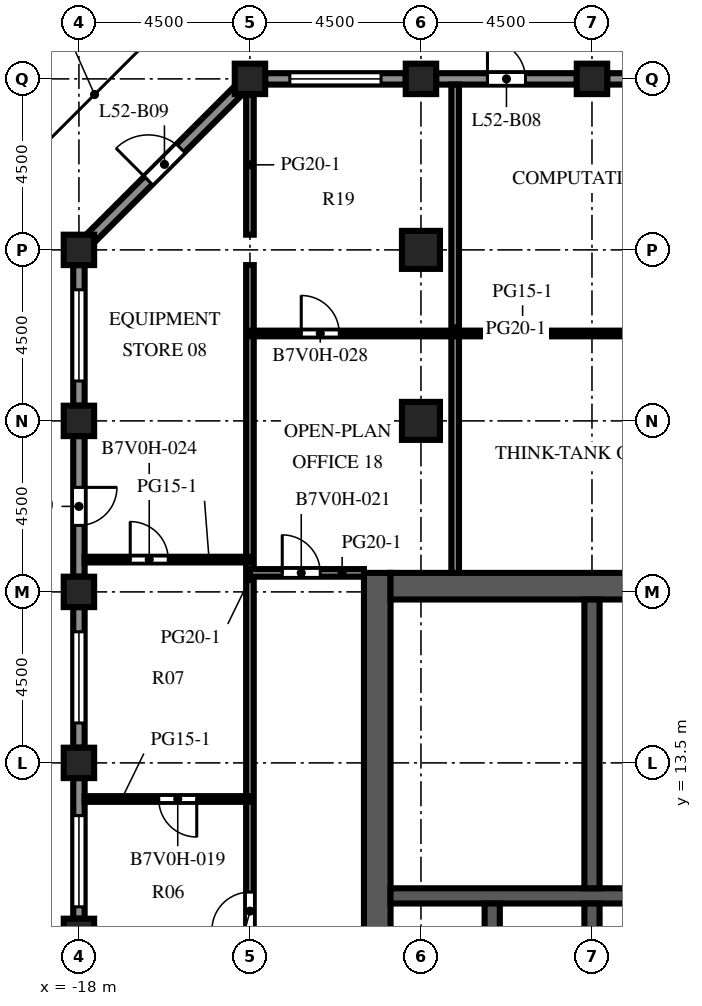
"""IFC4 building model, lengths in metres.
Left out: names, types, materials, properties, quantities, classifications, styles, units other than length and angle.
Written with IfcOpenShell. Run it as: python <this file> out.ifc"""

import sys

from ifc_helpers import new_model, si_unit, direction, frame, frame_2d, origin, origin_2d, place, context, subcontext, project, spatial, rectangle, extrude, element, fill, save


model = new_model("IFC4")
c1 = context("Model", 3, precision=1e-05, world=origin(), true_north=direction((0.0, 1.0)))
c2 = subcontext(c1, "Body", "Model", "MODEL_VIEW")
j1 = project(units=[si_unit("LENGTHUNIT", "METRE"), si_unit("PLANEANGLEUNIT", "RADIAN")], contexts=[c1])
p1 = place(None, origin())
s1 = spatial("IfcSite", under=j1, at=p1, CompositionType="ELEMENT")
p2 = place(p1, origin())
s2 = spatial("IfcBuilding", under=s1, at=p2, CompositionType="ELEMENT")
p3 = place(p2, frame((0.0, 0.0, 231.6)))
s3 = spatial("IfcBuildingStorey", under=s2, at=p3, CompositionType="ELEMENT", Elevation=231.6)
for number, where, z_axis, x_axis in (
    (1, (-18.0, 9.0, 0.0), (0.0, 0.0, 1.0), (1.0, 0.0, 0.0)),
    (2, (-18.0, 13.5, 0.0), (0.0, 0.0, 1.0), (1.0, 0.0, 0.0)),
    (3, (-18.0, 18.0, 0.0), (0.0, 0.0, 1.0), (1.0, 0.0, 0.0)),
    (4, (-18.0, 22.5, 0.0), (0.0, 0.0, 1.0), (1.0, 0.0, 0.0)),
    (5, (-18.0, 27.0, 0.0), (0.0, 0.0, 1.0), (1.0, 0.0, 0.0)),
):
    element("IfcColumn", number, at=place(p3, frame(where, z_axis=z_axis, x_axis=x_axis)), inside=s3, PredefinedType="COLUMN", context=c2, shape_type="SweptSolid", body=[
        extrude(rectangle(XDim=0.8, YDim=0.8, at=origin_2d()), origin(), (0.0, 0.0, 1.0), 4.1),
    ])
for number, where, z_axis, x_axis in (
    (6, (-13.5, 31.5, -0.45), (0.0, 0.0, 1.0), (1.0, 0.0, 0.0)),
    (7, (-9.0, 31.5, -0.45), (0.0, 0.0, 1.0), (1.0, 0.0, 0.0)),
    (8, (-4.5, 31.5, -0.45), (0.0, 0.0, 1.0), (1.0, 0.0, 0.0)),
):
    element("IfcColumn", number, at=place(p3, frame(where, z_axis=z_axis, x_axis=x_axis)), inside=s3, PredefinedType="COLUMN", context=c2, shape_type="SweptSolid", body=[
        extrude(rectangle(XDim=0.8, YDim=0.8, at=origin_2d()), origin(), (0.0, 0.0, 1.0), 4.55),
    ])
for number, where, z_axis, x_axis in (
    (9, (-9.0, 22.5, -0.45), (0.0, 0.0, 1.0), (1.0, 0.0, 0.0)),
    (10, (-9.0, 27.0, -0.45), (0.0, 0.0, 1.0), (1.0, 0.0, 0.0)),
):
    element("IfcColumn", number, at=place(p3, frame(where, z_axis=z_axis, x_axis=x_axis)), inside=s3, PredefinedType="COLUMN", context=c2, shape_type="SweptSolid", body=[
        extrude(rectangle(XDim=1.0, YDim=1.0, at=origin_2d()), origin(), (0.0, 0.0, 1.0), 4.55),
    ])
p4 = place(p3, frame((-10.15, -9.0, 0.0), z_axis=(0.0, 0.0, 1.0), x_axis=(0.0, 1.0, 0.0)))
e11 = element("IfcWall", 11, at=p4, inside=s3, PredefinedType="SHEAR", context=c2, shape_type="SweptSolid", body=[
    extrude(rectangle(XDim=27.5, YDim=0.7, at=frame_2d((13.75, 0.0))), origin(), (0.0, 0.0, 1.0), 4.1),
])
p5 = place(p4, frame((12.55, 0.0, 0.0)))
e12 = element("IfcOpeningElement", 12, at=p5, cuts=e11, PredefinedType="OPENING", context=c2, shape_type="SweptSolid", body=[
    extrude(rectangle(XDim=2.4, YDim=2.4, at=frame_2d((1.2, 1.2))), frame((0.0, 0.36, 0.0), z_axis=(0.0, -1.0, 0.0), x_axis=(1.0, 0.0, 0.0)), (0.0, 0.0, 1.0), 0.72),
])
p6 = place(p4, frame((6.825, 0.0, 0.0)))
e13 = element("IfcOpeningElement", 13, at=p6, cuts=e11, PredefinedType="OPENING", context=c2, shape_type="SweptSolid", body=[
    extrude(rectangle(XDim=1.2, YDim=2.1, at=frame_2d((0.6, 1.05))), frame((0.0, 0.36, 0.0), z_axis=(0.0, -1.0, 0.0), x_axis=(1.0, 0.0, 0.0)), (0.0, 0.0, 1.0), 0.72),
])
p7 = place(p4, frame((19.475, 0.0, 0.0)))
e14 = element("IfcOpeningElement", 14, at=p7, cuts=e11, PredefinedType="OPENING", context=c2, shape_type="SweptSolid", body=[
    extrude(rectangle(XDim=1.2, YDim=2.1, at=frame_2d((0.6, 1.05))), frame((0.0, 0.36, 0.0), z_axis=(0.0, -1.0, 0.0), x_axis=(1.0, 0.0, 0.0)), (0.0, 0.0, 1.0), 0.72),
])
p8 = place(p3, frame((-9.8, 18.15, 0.0), z_axis=(0.0, 0.0, 1.0), x_axis=(1.0, 0.0, 0.0)))
e15 = element("IfcWall", 15, at=p8, inside=s3, PredefinedType="SHEAR", context=c2, shape_type="SweptSolid", body=[
    extrude(rectangle(XDim=10.6, YDim=0.7, at=frame_2d((5.3, 0.0))), origin(), (0.0, 0.0, 1.0), 4.1),
])
p9 = place(p3, frame((-9.8, 10.0, 0.0), z_axis=(0.0, 0.0, 1.0), x_axis=(1.0, 0.0, 0.0)))
e16 = element("IfcWall", 16, at=p9, inside=s3, PredefinedType="SHEAR", context=c2, shape_type="SweptSolid", body=[
    extrude(rectangle(XDim=10.6, YDim=0.4, at=frame_2d((5.3, 0.0))), origin(), (0.0, 0.0, 1.0), 4.1),
])
for number, where, z_axis, x_axis in (
    (17, (-7.125, 6.9, 0.0), (0.0, 0.0, 1.0), (0.0, 1.0, 0.0)),
    (18, (-4.5, 6.9, 0.0), (0.0, 0.0, 1.0), (0.0, 1.0, 0.0)),
):
    element("IfcWall", number, at=place(p3, frame(where, z_axis=z_axis, x_axis=x_axis)), inside=s3, PredefinedType="SHEAR", context=c2, shape_type="SweptSolid", body=[
        extrude(rectangle(XDim=2.9, YDim=0.4, at=frame_2d((1.45, 0.0))), origin(), (0.0, 0.0, 1.0), 4.1),
    ])
p10 = place(p3, frame((-4.5, 10.2, 0.0), z_axis=(0.0, 0.0, 1.0), x_axis=(0.0, 1.0, 0.0)))
e19 = element("IfcWall", 19, at=p10, inside=s3, PredefinedType="SHEAR", context=c2, shape_type="SweptSolid", body=[
    extrude(rectangle(XDim=7.6, YDim=0.4, at=frame_2d((3.8, 0.0))), origin(), (0.0, 0.0, 1.0), 4.1),
])
p11 = place(p3, frame((-4.1, 31.5, 0.0), z_axis=(0.0, 0.0, 1.0), x_axis=(1.0, 0.0, 0.0)))
e20 = element("IfcWall", 20, at=p11, inside=s3, PredefinedType="SOLIDWALL", context=c2, shape_type="SweptSolid", body=[
    extrude(rectangle(XDim=3.7, YDim=0.3, at=frame_2d((1.85, 0.0))), origin(), (0.0, 0.0, 1.0), 2.85),
])
p12 = place(p11, frame((0.65, 0.0, 0.8)))
e21 = element("IfcOpeningElement", 21, at=p12, cuts=e20, PredefinedType="OPENING", context=c2, shape_type="SweptSolid", body=[
    extrude(rectangle(XDim=2.4, YDim=1.7, at=frame_2d((1.2, 0.85))), frame((0.0, 0.16, 0.0), z_axis=(0.0, -1.0, 0.0), x_axis=(1.0, 0.0, 0.0)), (0.0, 0.0, 1.0), 0.32),
])
p13 = place(p3, frame((-8.6, 31.5, 0.0), z_axis=(0.0, 0.0, 1.0), x_axis=(1.0, 0.0, 0.0)))
e22 = element("IfcWall", 22, at=p13, inside=s3, PredefinedType="SOLIDWALL", context=c2, shape_type="SweptSolid", body=[
    extrude(rectangle(XDim=3.7, YDim=0.3, at=frame_2d((1.85, 0.0))), origin(), (0.0, 0.0, 1.0), 2.85),
])
p14 = place(p13, frame((1.35, 0.0, 0.0)))
e23 = element("IfcOpeningElement", 23, at=p14, cuts=e22, PredefinedType="OPENING", context=c2, shape_type="SweptSolid", body=[
    extrude(rectangle(XDim=1.0, YDim=2.2, at=frame_2d((0.5, 1.1))), frame((0.0, 0.16, 0.0), z_axis=(0.0, -1.0, 0.0), x_axis=(1.0, 0.0, 0.0)), (0.0, 0.0, 1.0), 0.32),
])
p15 = place(p3, frame((-13.1, 31.5, 0.0), z_axis=(0.0, 0.0, 1.0), x_axis=(1.0, 0.0, 0.0)))
e24 = element("IfcWall", 24, at=p15, inside=s3, PredefinedType="SOLIDWALL", context=c2, shape_type="SweptSolid", body=[
    extrude(rectangle(XDim=3.7, YDim=0.3, at=frame_2d((1.85, 0.0))), origin(), (0.0, 0.0, 1.0), 2.85),
])
p16 = place(p15, frame((0.65, 0.0, 0.8)))
e25 = element("IfcOpeningElement", 25, at=p16, cuts=e24, PredefinedType="OPENING", context=c2, shape_type="SweptSolid", body=[
    extrude(rectangle(XDim=2.4, YDim=1.7, at=frame_2d((1.2, 0.85))), frame((0.0, 0.16, 0.0), z_axis=(0.0, -1.0, 0.0), x_axis=(1.0, 0.0, 0.0)), (0.0, 0.0, 1.0), 0.32),
])
p17 = place(p3, frame((-17.706, 27.294, 0.0), z_axis=(0.0, 0.0, 1.0), x_axis=(0.707106781187, 0.707106781187, 0.0)))
e26 = element("IfcWall", 26, at=p17, inside=s3, PredefinedType="SOLIDWALL", context=c2, shape_type="SweptSolid", body=[
    extrude(rectangle(XDim=5.532, YDim=0.3, at=frame_2d((2.766, 0.0))), origin(), (0.0, 0.0, 1.0), 2.85),
])
p18 = place(p17, frame((2.166, 0.0, 0.0)))
e27 = element("IfcOpeningElement", 27, at=p18, cuts=e26, PredefinedType="OPENING", context=c2, shape_type="SweptSolid", body=[
    extrude(rectangle(XDim=1.2, YDim=2.2, at=frame_2d((0.6, 1.1))), frame((0.0, 0.16, 0.0), z_axis=(0.0, -1.0, 0.0), x_axis=(1.0, 0.0, 0.0)), (0.0, 0.0, 1.0), 0.32),
])
p19 = place(p3, frame((-18.0, 22.9, 0.0), z_axis=(0.0, 0.0, 1.0), x_axis=(0.0, 1.0, 0.0)))
e28 = element("IfcWall", 28, at=p19, inside=s3, PredefinedType="SOLIDWALL", context=c2, shape_type="SweptSolid", body=[
    extrude(rectangle(XDim=3.7, YDim=0.3, at=frame_2d((1.85, 0.0))), origin(), (0.0, 0.0, 1.0), 2.85),
])
p20 = place(p19, frame((0.65, 0.0, 0.8)))
e29 = element("IfcOpeningElement", 29, at=p20, cuts=e28, PredefinedType="OPENING", context=c2, shape_type="SweptSolid", body=[
    extrude(rectangle(XDim=2.4, YDim=1.7, at=frame_2d((1.2, 0.85))), frame((0.0, 0.16, 0.0), z_axis=(0.0, -1.0, 0.0), x_axis=(1.0, 0.0, 0.0)), (0.0, 0.0, 1.0), 0.32),
])
p21 = place(p3, frame((-18.0, 18.4, 0.0), z_axis=(0.0, 0.0, 1.0), x_axis=(0.0, 1.0, 0.0)))
e30 = element("IfcWall", 30, at=p21, inside=s3, PredefinedType="SOLIDWALL", context=c2, shape_type="SweptSolid", body=[
    extrude(rectangle(XDim=3.7, YDim=0.3, at=frame_2d((1.85, 0.0))), origin(), (0.0, 0.0, 1.0), 2.85),
])
p22 = place(p21, frame((1.35, 0.0, 0.0)))
e31 = element("IfcOpeningElement", 31, at=p22, cuts=e30, PredefinedType="OPENING", context=c2, shape_type="SweptSolid", body=[
    extrude(rectangle(XDim=1.0, YDim=2.2, at=frame_2d((0.5, 1.1))), frame((0.0, 0.16, 0.0), z_axis=(0.0, -1.0, 0.0), x_axis=(1.0, 0.0, 0.0)), (0.0, 0.0, 1.0), 0.32),
])
p23 = place(p3, frame((-18.0, 13.9, 0.0), z_axis=(0.0, 0.0, 1.0), x_axis=(0.0, 1.0, 0.0)))
e32 = element("IfcWall", 32, at=p23, inside=s3, PredefinedType="SOLIDWALL", context=c2, shape_type="SweptSolid", body=[
    extrude(rectangle(XDim=3.7, YDim=0.3, at=frame_2d((1.85, 0.0))), origin(), (0.0, 0.0, 1.0), 2.85),
])
p24 = place(p23, frame((0.65, 0.0, 0.8)))
e33 = element("IfcOpeningElement", 33, at=p24, cuts=e32, PredefinedType="OPENING", context=c2, shape_type="SweptSolid", body=[
    extrude(rectangle(XDim=2.4, YDim=1.7, at=frame_2d((1.2, 0.85))), frame((0.0, 0.16, 0.0), z_axis=(0.0, -1.0, 0.0), x_axis=(1.0, 0.0, 0.0)), (0.0, 0.0, 1.0), 0.32),
])
p25 = place(p3, frame((-18.0, 9.4, 0.0), z_axis=(0.0, 0.0, 1.0), x_axis=(0.0, 1.0, 0.0)))
e34 = element("IfcWall", 34, at=p25, inside=s3, PredefinedType="SOLIDWALL", context=c2, shape_type="SweptSolid", body=[
    extrude(rectangle(XDim=3.7, YDim=0.3, at=frame_2d((1.85, 0.0))), origin(), (0.0, 0.0, 1.0), 2.85),
])
p26 = place(p25, frame((0.312, 0.0, 0.8)))
e35 = element("IfcOpeningElement", 35, at=p26, cuts=e34, PredefinedType="OPENING", context=c2, shape_type="SweptSolid", body=[
    extrude(rectangle(XDim=2.4, YDim=1.7, at=frame_2d((1.2, 0.85))), frame((0.0, 0.16, 0.0), z_axis=(0.0, -1.0, 0.0), x_axis=(1.0, 0.0, 0.0)), (0.0, 0.0, 1.0), 0.32),
])
for number, where, z_axis, x_axis in (
    (36, (-4.3, 11.72, 0.0), (0.0, 0.0, 1.0), (1.0, 0.0, 0.0)),
    (37, (-4.3, 13.62, 0.0), (0.0, 0.0, 1.0), (1.0, 0.0, 0.0)),
    (38, (-4.3, 15.9, 0.0), (0.0, 0.0, 1.0), (1.0, 0.0, 0.0)),
):
    element("IfcWall", number, at=place(p3, frame(where, z_axis=z_axis, x_axis=x_axis)), inside=s3, PredefinedType="PARTITIONING", context=c2, shape_type="SweptSolid", body=[
        extrude(rectangle(XDim=5.1, YDim=0.1, at=frame_2d((2.55, 0.0))), origin(), (0.0, 0.0, 1.0), 3.65),
    ])
p27 = place(p3, frame((-13.5, 6.25, 0.0), z_axis=(0.0, 0.0, 1.0), x_axis=(0.0, 1.0, 0.0)))
e39 = element("IfcWall", 39, at=p27, inside=s3, PredefinedType="PARTITIONING", context=c2, shape_type="SweptSolid", body=[
    extrude(rectangle(XDim=20.35, YDim=0.2, at=frame_2d((10.175, 0.0))), origin(), (0.0, 0.0, 1.0), 3.65),
])
p28 = place(p27, frame((2.85, 0.0, 0.0)))
e40 = element("IfcOpeningElement", 40, at=p28, cuts=e39, PredefinedType="OPENING", context=c2, shape_type="SweptSolid", body=[
    extrude(rectangle(XDim=1.0, YDim=2.1, at=frame_2d((0.5, 1.05))), frame((0.0, 0.11, 0.0), z_axis=(0.0, -1.0, 0.0), x_axis=(1.0, 0.0, 0.0)), (0.0, 0.0, 1.0), 0.22),
])
p29 = place(p3, frame((-13.5, 27.4, 0.0), z_axis=(0.0, 0.0, 1.0), x_axis=(0.0, 1.0, 0.0)))
e41 = element("IfcWall", 41, at=p29, inside=s3, PredefinedType="PARTITIONING", context=c2, shape_type="SweptSolid", body=[
    extrude(rectangle(XDim=3.677, YDim=0.2, at=frame_2d((1.839, 0.0))), origin(), (0.0, 0.0, 1.0), 3.65),
])
p30 = place(p3, frame((-8.1, 18.5, 0.0), z_axis=(0.0, 0.0, 1.0), x_axis=(0.0, 1.0, 0.0)))
e42 = element("IfcWall", 42, at=p30, inside=s3, PredefinedType="PARTITIONING", context=c2, shape_type="SweptSolid", body=[
    extrude(rectangle(XDim=12.85, YDim=0.2, at=frame_2d((6.425, 0.0))), origin(), (0.0, 0.0, 1.0), 3.65),
])
p31 = place(p3, frame((-17.85, 12.55, 0.0), z_axis=(0.0, 0.0, 1.0), x_axis=(1.0, 0.0, 0.0)))
e43 = element("IfcWall", 43, at=p31, inside=s3, PredefinedType="PARTITIONING", context=c2, shape_type="SweptSolid", body=[
    extrude(rectangle(XDim=4.35, YDim=0.15, at=frame_2d((2.175, 0.0))), origin(), (0.0, 0.0, 1.0), 3.65),
])
p32 = place(p31, frame((1.95, 0.0, 0.0)))
e44 = element("IfcOpeningElement", 44, at=p32, cuts=e43, PredefinedType="OPENING", context=c2, shape_type="SweptSolid", body=[
    extrude(rectangle(XDim=1.0, YDim=2.1, at=frame_2d((0.5, 1.05))), frame((0.0, 0.085, 0.0), z_axis=(0.0, -1.0, 0.0), x_axis=(1.0, 0.0, 0.0)), (0.0, 0.0, 1.0), 0.17),
])
p33 = place(p3, frame((-13.5, 18.5, 0.0), z_axis=(0.0, 0.0, 1.0), x_axis=(1.0, 0.0, 0.0)))
e45 = element("IfcWall", 45, at=p33, inside=s3, PredefinedType="PARTITIONING", context=c2, shape_type="SweptSolid", body=[
    extrude(rectangle(XDim=3.0, YDim=0.2, at=frame_2d((1.5, 0.0))), origin(), (0.0, 0.0, 1.0), 3.65),
])
p34 = place(p33, frame((0.85, 0.0, 0.0)))
e46 = element("IfcOpeningElement", 46, at=p34, cuts=e45, PredefinedType="OPENING", context=c2, shape_type="SweptSolid", body=[
    extrude(rectangle(XDim=1.0, YDim=2.1, at=frame_2d((0.5, 1.05))), frame((0.0, 0.11, 0.0), z_axis=(0.0, -1.0, 0.0), x_axis=(1.0, 0.0, 0.0)), (0.0, 0.0, 1.0), 0.22),
])
p35 = place(p3, frame((-17.85, 18.85, 0.0), z_axis=(0.0, 0.0, 1.0), x_axis=(1.0, 0.0, 0.0)))
e47 = element("IfcWall", 47, at=p35, inside=s3, PredefinedType="PARTITIONING", context=c2, shape_type="SweptSolid", body=[
    extrude(rectangle(XDim=4.35, YDim=0.15, at=frame_2d((2.175, 0.0))), origin(), (0.0, 0.0, 1.0), 3.65),
])
p36 = place(p35, frame((1.2, 0.0, 0.0)))
e48 = element("IfcOpeningElement", 48, at=p36, cuts=e47, PredefinedType="OPENING", context=c2, shape_type="SweptSolid", body=[
    extrude(rectangle(XDim=1.0, YDim=2.1, at=frame_2d((0.5, 1.05))), frame((0.0, 0.085, 0.0), z_axis=(0.0, -1.0, 0.0), x_axis=(1.0, 0.0, 0.0)), (0.0, 0.0, 1.0), 0.17),
])
p37 = place(p3, frame((-13.5, 24.8, 0.0), z_axis=(0.0, 0.0, 1.0), x_axis=(1.0, 0.0, 0.0)))
e49 = element("IfcWall", 49, at=p37, inside=s3, PredefinedType="PARTITIONING", context=c2, shape_type="SweptSolid", body=[
    extrude(rectangle(XDim=34.5, YDim=0.15, at=frame_2d((17.25, 0.0))), origin(), (0.0, 0.0, 1.0), 3.65),
])
p38 = place(p37, frame((1.35, 0.0, 0.0)))
e50 = element("IfcOpeningElement", 50, at=p38, cuts=e49, PredefinedType="OPENING", context=c2, shape_type="SweptSolid", body=[
    extrude(rectangle(XDim=1.0, YDim=2.1, at=frame_2d((0.5, 1.05))), frame((0.0, 0.085, 0.0), z_axis=(0.0, -1.0, 0.0), x_axis=(1.0, 0.0, 0.0)), (0.0, 0.0, 1.0), 0.17),
])
p39 = place(p37, frame((12.0, 0.0, 0.0)))
e51 = element("IfcOpeningElement", 51, at=p39, cuts=e49, PredefinedType="OPENING", context=c2, shape_type="SweptSolid", body=[
    extrude(rectangle(XDim=1.0, YDim=2.1, at=frame_2d((0.5, 1.05))), frame((0.0, 0.085, 0.0), z_axis=(0.0, -1.0, 0.0), x_axis=(1.0, 0.0, 0.0)), (0.0, 0.0, 1.0), 0.17),
])
p40 = place(p37, frame((20.85, 0.0, 0.0)))
e52 = element("IfcOpeningElement", 52, at=p40, cuts=e49, PredefinedType="OPENING", context=c2, shape_type="SweptSolid", body=[
    extrude(rectangle(XDim=1.0, YDim=2.1, at=frame_2d((0.5, 1.05))), frame((0.0, 0.085, 0.0), z_axis=(0.0, -1.0, 0.0), x_axis=(1.0, 0.0, 0.0)), (0.0, 0.0, 1.0), 0.17),
])
p41 = place(p37, frame((29.85, 0.0, 0.0)))
e53 = element("IfcOpeningElement", 53, at=p41, cuts=e49, PredefinedType="OPENING", context=c2, shape_type="SweptSolid", body=[
    extrude(rectangle(XDim=1.0, YDim=2.1, at=frame_2d((0.5, 1.05))), frame((0.0, 0.085, 0.0), z_axis=(0.0, -1.0, 0.0), x_axis=(1.0, 0.0, 0.0)), (0.0, 0.0, 1.0), 0.17),
])
p42 = place(p14, origin())
e54 = element("IfcDoor", 54, at=p42, inside=s3, OperationType="SINGLE_SWING_LEFT", PredefinedType="DOOR", context=c2, shape_type="SweptSolid", body=[
    extrude(rectangle(XDim=1.0, YDim=2.2, at=frame_2d((0.5, 1.1))), frame((0.0, 0.025, 0.0), z_axis=(0.0, -1.0, 0.0), x_axis=(1.0, 0.0, 0.0)), (0.0, 0.0, 1.0), 0.05),
])
fill(e23, e54)
p43 = place(p16, origin())
e55 = element("IfcWindow", 55, at=p43, inside=s3, PartitioningType="SINGLE_PANEL", PredefinedType="WINDOW", context=c2, shape_type="SweptSolid", body=[
    extrude(rectangle(XDim=2.4, YDim=1.7, at=frame_2d((1.2, 0.85))), frame((0.0, 0.03, 0.0), z_axis=(0.0, -1.0, 0.0), x_axis=(1.0, 0.0, 0.0)), (0.0, 0.0, 1.0), 0.06),
])
fill(e25, e55)
p44 = place(p18, origin())
e56 = element("IfcDoor", 56, at=p44, inside=s3, OperationType="SINGLE_SWING_LEFT", PredefinedType="DOOR", context=c2, shape_type="SweptSolid", body=[
    extrude(rectangle(XDim=1.2, YDim=2.2, at=frame_2d((0.6, 1.1))), frame((0.0, 0.025, 0.0), z_axis=(0.0, -1.0, 0.0), x_axis=(1.0, 0.0, 0.0)), (0.0, 0.0, 1.0), 0.05),
])
fill(e27, e56)
p45 = place(p20, origin())
e57 = element("IfcWindow", 57, at=p45, inside=s3, PartitioningType="SINGLE_PANEL", PredefinedType="WINDOW", context=c2, shape_type="SweptSolid", body=[
    extrude(rectangle(XDim=2.4, YDim=1.7, at=frame_2d((1.2, 0.85))), frame((0.0, 0.03, 0.0), z_axis=(0.0, -1.0, 0.0), x_axis=(1.0, 0.0, 0.0)), (0.0, 0.0, 1.0), 0.06),
])
fill(e29, e57)
p46 = place(p22, origin())
e58 = element("IfcDoor", 58, at=p46, inside=s3, OperationType="SINGLE_SWING_RIGHT", PredefinedType="DOOR", context=c2, shape_type="SweptSolid", body=[
    extrude(rectangle(XDim=1.0, YDim=2.2, at=frame_2d((0.5, 1.1))), frame((0.0, 0.025, 0.0), z_axis=(0.0, -1.0, 0.0), x_axis=(1.0, 0.0, 0.0)), (0.0, 0.0, 1.0), 0.05),
])
fill(e31, e58)
p47 = place(p24, origin())
e59 = element("IfcWindow", 59, at=p47, inside=s3, PartitioningType="SINGLE_PANEL", PredefinedType="WINDOW", context=c2, shape_type="SweptSolid", body=[
    extrude(rectangle(XDim=2.4, YDim=1.7, at=frame_2d((1.2, 0.85))), frame((0.0, 0.03, 0.0), z_axis=(0.0, -1.0, 0.0), x_axis=(1.0, 0.0, 0.0)), (0.0, 0.0, 1.0), 0.06),
])
fill(e33, e59)
p48 = place(p26, origin())
e60 = element("IfcWindow", 60, at=p48, inside=s3, PartitioningType="SINGLE_PANEL", PredefinedType="WINDOW", context=c2, shape_type="SweptSolid", body=[
    extrude(rectangle(XDim=2.4, YDim=1.7, at=frame_2d((1.2, 0.85))), frame((0.0, 0.03, 0.0), z_axis=(0.0, -1.0, 0.0), x_axis=(1.0, 0.0, 0.0)), (0.0, 0.0, 1.0), 0.06),
])
fill(e35, e60)
p49 = place(p7, origin())
e61 = element("IfcDoor", 61, at=p49, inside=s3, OperationType="SINGLE_SWING_LEFT", PredefinedType="DOOR", context=c2, shape_type="SweptSolid", body=[
    extrude(rectangle(XDim=1.2, YDim=2.1, at=frame_2d((0.6, 1.05))), frame((0.0, 0.025, 0.0), z_axis=(0.0, -1.0, 0.0), x_axis=(1.0, 0.0, 0.0)), (0.0, 0.0, 1.0), 0.05),
])
fill(e14, e61)
p50 = place(p28, origin())
e62 = element("IfcDoor", 62, at=p50, inside=s3, OperationType="SINGLE_SWING_LEFT", PredefinedType="DOOR", context=c2, shape_type="SweptSolid", body=[
    extrude(rectangle(XDim=1.0, YDim=2.1, at=frame_2d((0.5, 1.05))), frame((0.0, 0.025, 0.0), z_axis=(0.0, -1.0, 0.0), x_axis=(1.0, 0.0, 0.0)), (0.0, 0.0, 1.0), 0.05),
])
fill(e40, e62)
p51 = place(p32, origin())
e63 = element("IfcDoor", 63, at=p51, inside=s3, OperationType="SINGLE_SWING_RIGHT", PredefinedType="DOOR", context=c2, shape_type="SweptSolid", body=[
    extrude(rectangle(XDim=1.0, YDim=2.1, at=frame_2d((0.5, 1.05))), frame((0.0, 0.025, 0.0), z_axis=(0.0, -1.0, 0.0), x_axis=(1.0, 0.0, 0.0)), (0.0, 0.0, 1.0), 0.05),
])
fill(e44, e63)
p52 = place(p34, origin())
e64 = element("IfcDoor", 64, at=p52, inside=s3, OperationType="SINGLE_SWING_LEFT", PredefinedType="DOOR", context=c2, shape_type="SweptSolid", body=[
    extrude(rectangle(XDim=1.0, YDim=2.1, at=frame_2d((0.5, 1.05))), frame((0.0, 0.025, 0.0), z_axis=(0.0, -1.0, 0.0), x_axis=(1.0, 0.0, 0.0)), (0.0, 0.0, 1.0), 0.05),
])
fill(e46, e64)
p53 = place(p36, origin())
e65 = element("IfcDoor", 65, at=p53, inside=s3, OperationType="SINGLE_SWING_LEFT", PredefinedType="DOOR", context=c2, shape_type="SweptSolid", body=[
    extrude(rectangle(XDim=1.0, YDim=2.1, at=frame_2d((0.5, 1.05))), frame((0.0, 0.025, 0.0), z_axis=(0.0, -1.0, 0.0), x_axis=(1.0, 0.0, 0.0)), (0.0, 0.0, 1.0), 0.05),
])
fill(e48, e65)
p54 = place(p38, origin())
e66 = element("IfcDoor", 66, at=p54, inside=s3, OperationType="SINGLE_SWING_LEFT", PredefinedType="DOOR", context=c2, shape_type="SweptSolid", body=[
    extrude(rectangle(XDim=1.0, YDim=2.1, at=frame_2d((0.5, 1.05))), frame((0.0, 0.025, 0.0), z_axis=(0.0, -1.0, 0.0), x_axis=(1.0, 0.0, 0.0)), (0.0, 0.0, 1.0), 0.05),
])
fill(e50, e66)
save(model, sys.argv[1])
